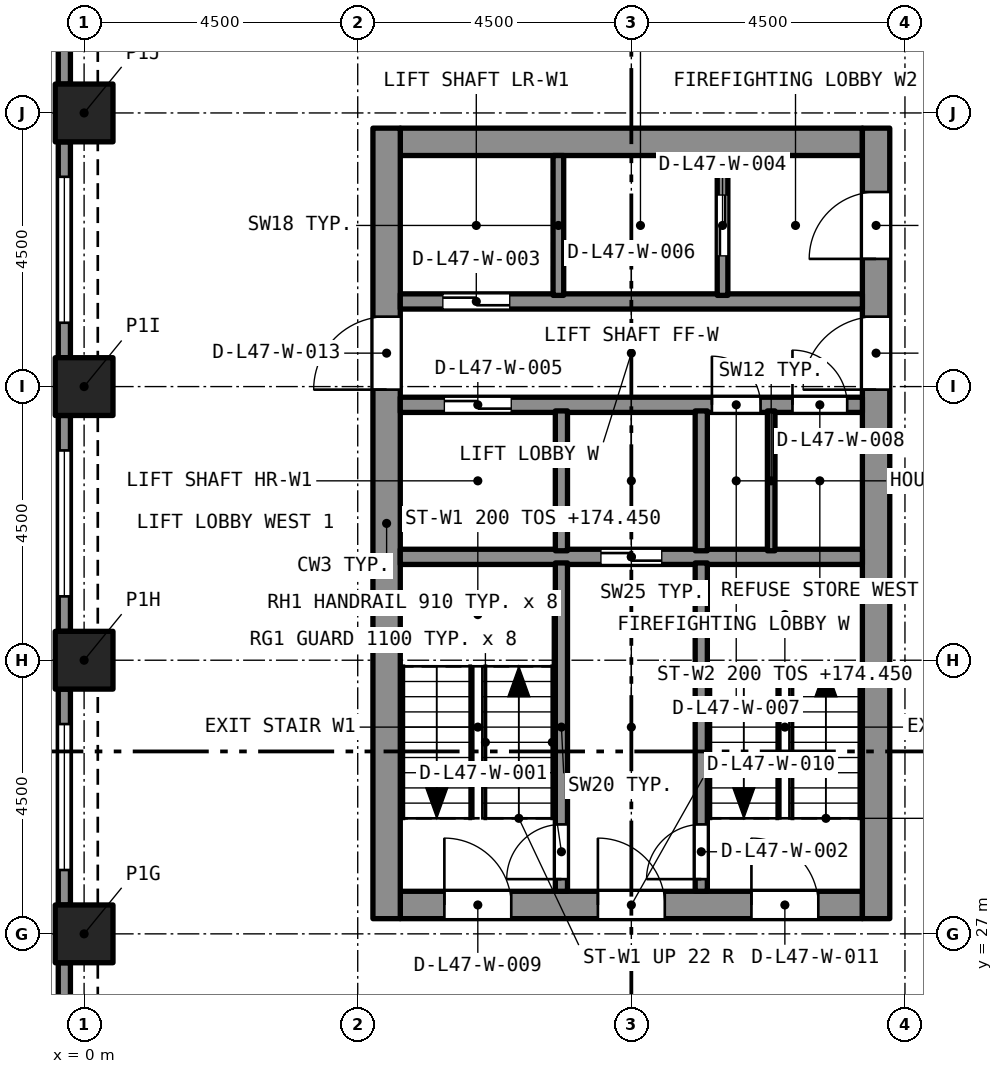
"""IFC4 building model, lengths in metres.
Left out: names, types, materials, properties, quantities, classifications, styles, units other than length and angle.
Written with IfcOpenShell. Run it as: python <this file> out.ifc"""

import sys

from ifc_helpers import new_model, si_unit, direction, frame, frame_2d, origin, origin_2d, place, context, subcontext, project, spatial, rectangle, extrude, element, fill, save


model = new_model("IFC4")
c1 = context("Model", 3, precision=1e-05, world=origin(), true_north=direction((0.0, 1.0)))
c2 = subcontext(c1, "Body", "Model", "MODEL_VIEW")
j1 = project(units=[si_unit("LENGTHUNIT", "METRE"), si_unit("PLANEANGLEUNIT", "RADIAN")], contexts=[c1])
p1 = place(None, origin())
s1 = spatial("IfcSite", under=j1, at=p1, CompositionType="ELEMENT")
p2 = place(p1, origin())
s2 = spatial("IfcBuilding", under=s1, at=p2, CompositionType="ELEMENT")
p3 = place(p2, frame((0.0, 0.0, 172.6)))
s3 = spatial("IfcBuildingStorey", under=s2, at=p3, CompositionType="ELEMENT", Elevation=172.6)
for number, where, z_axis, x_axis in (
    (1, (0.0, 27.0, 0.0), (0.0, 0.0, 1.0), (1.0, 0.0, 0.0)),
    (2, (0.0, 31.5, 0.0), (0.0, 0.0, 1.0), (1.0, 0.0, 0.0)),
    (3, (0.0, 36.0, 0.0), (0.0, 0.0, 1.0), (1.0, 0.0, 0.0)),
    (4, (0.0, 40.5, 0.0), (0.0, 0.0, 1.0), (1.0, 0.0, 0.0)),
):
    element("IfcColumn", number, at=place(p3, frame(where, z_axis=z_axis, x_axis=x_axis)), inside=s3, PredefinedType="COLUMN", context=c2, shape_type="SweptSolid", body=[
        extrude(rectangle(XDim=0.95, YDim=0.95, at=origin_2d()), origin(), (0.0, 0.0, 1.0), 3.7),
    ])
p4 = place(p3, frame((5.2, 27.475, 0.0), z_axis=(0.0, 0.0, 1.0), x_axis=(1.0, 0.0, 0.0)))
e5 = element("IfcWall", 5, at=p4, inside=s3, PredefinedType="SOLIDWALL", context=c2, shape_type="SweptSolid", body=[
    extrude(rectangle(XDim=7.6, YDim=0.45, at=frame_2d((3.8, 0.0))), origin(), (0.0, 0.0, 1.0), 3.7),
])
p5 = place(p4, frame((0.725, 0.0, 0.0)))
e6 = element("IfcOpeningElement", 6, at=p5, cuts=e5, PredefinedType="OPENING", context=c2, shape_type="SweptSolid", body=[
    extrude(rectangle(XDim=1.1, YDim=2.1, at=frame_2d((0.55, 1.05))), frame((0.0, 0.235, 0.0), z_axis=(0.0, -1.0, 0.0), x_axis=(1.0, 0.0, 0.0)), (0.0, 0.0, 1.0), 0.47),
])
p6 = place(p4, frame((3.25, 0.0, 0.0)))
e7 = element("IfcOpeningElement", 7, at=p6, cuts=e5, PredefinedType="OPENING", context=c2, shape_type="SweptSolid", body=[
    extrude(rectangle(XDim=1.1, YDim=2.1, at=frame_2d((0.55, 1.05))), frame((0.0, 0.235, 0.0), z_axis=(0.0, -1.0, 0.0), x_axis=(1.0, 0.0, 0.0)), (0.0, 0.0, 1.0), 0.47),
])
p7 = place(p4, frame((5.775, 0.0, 0.0)))
e8 = element("IfcOpeningElement", 8, at=p7, cuts=e5, PredefinedType="OPENING", context=c2, shape_type="SweptSolid", body=[
    extrude(rectangle(XDim=1.1, YDim=2.1, at=frame_2d((0.55, 1.05))), frame((0.0, 0.235, 0.0), z_axis=(0.0, -1.0, 0.0), x_axis=(1.0, 0.0, 0.0)), (0.0, 0.0, 1.0), 0.47),
])
p8 = place(p3, frame((5.2, 40.025, 0.0), z_axis=(0.0, 0.0, 1.0), x_axis=(1.0, 0.0, 0.0)))
e9 = element("IfcWall", 9, at=p8, inside=s3, PredefinedType="SOLIDWALL", context=c2, shape_type="SweptSolid", body=[
    extrude(rectangle(XDim=7.6, YDim=0.45, at=frame_2d((3.8, 0.0))), origin(), (0.0, 0.0, 1.0), 3.7),
])
p9 = place(p3, frame((4.975, 27.25, 0.0), z_axis=(0.0, 0.0, 1.0), x_axis=(0.0, 1.0, 0.0)))
e10 = element("IfcWall", 10, at=p9, inside=s3, PredefinedType="SOLIDWALL", context=c2, shape_type="SweptSolid", body=[
    extrude(rectangle(XDim=13.0, YDim=0.45, at=frame_2d((6.5, 0.0))), origin(), (0.0, 0.0, 1.0), 3.7),
])
p10 = place(p9, frame((8.7, 0.0, 0.0)))
e11 = element("IfcOpeningElement", 11, at=p10, cuts=e10, PredefinedType="OPENING", context=c2, shape_type="SweptSolid", body=[
    extrude(rectangle(XDim=1.2, YDim=2.1, at=frame_2d((0.6, 1.05))), frame((0.0, 0.235, 0.0), z_axis=(0.0, -1.0, 0.0), x_axis=(1.0, 0.0, 0.0)), (0.0, 0.0, 1.0), 0.47),
])
p11 = place(p3, frame((13.025, 27.25, 0.0), z_axis=(0.0, 0.0, 1.0), x_axis=(0.0, 1.0, 0.0)))
e12 = element("IfcWall", 12, at=p11, inside=s3, PredefinedType="SOLIDWALL", context=c2, shape_type="SweptSolid", body=[
    extrude(rectangle(XDim=13.0, YDim=0.45, at=frame_2d((6.5, 0.0))), origin(), (0.0, 0.0, 1.0), 3.7),
])
p12 = place(p11, frame((10.85, 0.0, 0.0)))
e13 = element("IfcOpeningElement", 13, at=p12, cuts=e12, PredefinedType="OPENING", context=c2, shape_type="SweptSolid", body=[
    extrude(rectangle(XDim=1.1, YDim=2.1, at=frame_2d((0.55, 1.05))), frame((0.0, 0.235, 0.0), z_axis=(0.0, -1.0, 0.0), x_axis=(1.0, 0.0, 0.0)), (0.0, 0.0, 1.0), 0.47),
])
p13 = place(p11, frame((8.7, 0.0, 0.0)))
e14 = element("IfcOpeningElement", 14, at=p13, cuts=e12, PredefinedType="OPENING", context=c2, shape_type="SweptSolid", body=[
    extrude(rectangle(XDim=1.2, YDim=2.1, at=frame_2d((0.6, 1.05))), frame((0.0, 0.235, 0.0), z_axis=(0.0, -1.0, 0.0), x_axis=(1.0, 0.0, 0.0)), (0.0, 0.0, 1.0), 0.47),
])
p14 = place(p3, frame((-0.325, 40.975, 0.0), z_axis=(0.0, 0.0, 1.0), x_axis=(0.0, 1.0, 0.0)))
e15 = element("IfcWall", 15, at=p14, inside=s3, PredefinedType="SOLIDWALL", context=c2, shape_type="SweptSolid", body=[
    extrude(rectangle(XDim=3.55, YDim=0.2, at=frame_2d((1.775, 0.0))), origin(), (0.0, 0.0, 1.0), 3.7),
])
p15 = place(p14, frame((0.575, 0.0, 0.45)))
e16 = element("IfcOpeningElement", 16, at=p15, cuts=e15, PredefinedType="OPENING", context=c2, shape_type="SweptSolid", body=[
    extrude(rectangle(XDim=2.4, YDim=1.95, at=frame_2d((1.2, 0.975))), frame((0.0, 0.11, 0.0), z_axis=(0.0, -1.0, 0.0), x_axis=(1.0, 0.0, 0.0)), (0.0, 0.0, 1.0), 0.22),
])
p16 = place(p3, frame((-0.325, 36.475, 0.0), z_axis=(0.0, 0.0, 1.0), x_axis=(0.0, 1.0, 0.0)))
e17 = element("IfcWall", 17, at=p16, inside=s3, PredefinedType="SOLIDWALL", context=c2, shape_type="SweptSolid", body=[
    extrude(rectangle(XDim=3.55, YDim=0.2, at=frame_2d((1.775, 0.0))), origin(), (0.0, 0.0, 1.0), 3.7),
])
p17 = place(p16, frame((0.575, 0.0, 0.45)))
e18 = element("IfcOpeningElement", 18, at=p17, cuts=e17, PredefinedType="OPENING", context=c2, shape_type="SweptSolid", body=[
    extrude(rectangle(XDim=2.4, YDim=1.95, at=frame_2d((1.2, 0.975))), frame((0.0, 0.11, 0.0), z_axis=(0.0, -1.0, 0.0), x_axis=(1.0, 0.0, 0.0)), (0.0, 0.0, 1.0), 0.22),
])
p18 = place(p3, frame((-0.325, 31.975, 0.0), z_axis=(0.0, 0.0, 1.0), x_axis=(0.0, 1.0, 0.0)))
e19 = element("IfcWall", 19, at=p18, inside=s3, PredefinedType="SOLIDWALL", context=c2, shape_type="SweptSolid", body=[
    extrude(rectangle(XDim=3.55, YDim=0.2, at=frame_2d((1.775, 0.0))), origin(), (0.0, 0.0, 1.0), 3.7),
])
p19 = place(p18, frame((0.575, 0.0, 0.45)))
e20 = element("IfcOpeningElement", 20, at=p19, cuts=e19, PredefinedType="OPENING", context=c2, shape_type="SweptSolid", body=[
    extrude(rectangle(XDim=2.4, YDim=1.95, at=frame_2d((1.2, 0.975))), frame((0.0, 0.11, 0.0), z_axis=(0.0, -1.0, 0.0), x_axis=(1.0, 0.0, 0.0)), (0.0, 0.0, 1.0), 0.22),
])
p20 = place(p3, frame((-0.325, 27.475, 0.0), z_axis=(0.0, 0.0, 1.0), x_axis=(0.0, 1.0, 0.0)))
e21 = element("IfcWall", 21, at=p20, inside=s3, PredefinedType="SOLIDWALL", context=c2, shape_type="SweptSolid", body=[
    extrude(rectangle(XDim=3.55, YDim=0.2, at=frame_2d((1.775, 0.0))), origin(), (0.0, 0.0, 1.0), 3.7),
])
p21 = place(p20, frame((0.575, 0.0, 0.45)))
e22 = element("IfcOpeningElement", 22, at=p21, cuts=e21, PredefinedType="OPENING", context=c2, shape_type="SweptSolid", body=[
    extrude(rectangle(XDim=2.4, YDim=1.95, at=frame_2d((1.2, 0.975))), frame((0.0, 0.11, 0.0), z_axis=(0.0, -1.0, 0.0), x_axis=(1.0, 0.0, 0.0)), (0.0, 0.0, 1.0), 0.22),
])
p22 = place(p3, frame((-0.325, 22.975, 0.0), z_axis=(0.0, 0.0, 1.0), x_axis=(0.0, 1.0, 0.0)))
e23 = element("IfcWall", 23, at=p22, inside=s3, PredefinedType="SOLIDWALL", context=c2, shape_type="SweptSolid", body=[
    extrude(rectangle(XDim=3.55, YDim=0.2, at=frame_2d((1.775, 0.0))), origin(), (0.0, 0.0, 1.0), 3.7),
])
p23 = place(p22, frame((0.575, 0.0, 0.45)))
e24 = element("IfcOpeningElement", 24, at=p23, cuts=e23, PredefinedType="OPENING", context=c2, shape_type="SweptSolid", body=[
    extrude(rectangle(XDim=2.4, YDim=1.95, at=frame_2d((1.2, 0.975))), frame((0.0, 0.11, 0.0), z_axis=(0.0, -1.0, 0.0), x_axis=(1.0, 0.0, 0.0)), (0.0, 0.0, 1.0), 0.22),
])
p24 = place(p3, frame((5.2, 33.2, 0.0), z_axis=(0.0, 0.0, 1.0), x_axis=(1.0, 0.0, 0.0)))
e25 = element("IfcWall", 25, at=p24, inside=s3, PredefinedType="SOLIDWALL", context=c2, shape_type="SweptSolid", body=[
    extrude(rectangle(XDim=7.6, YDim=0.25, at=frame_2d((3.8, 0.0))), origin(), (0.0, 0.0, 1.0), 3.4),
])
p25 = place(p24, frame((3.3, 0.0, 0.0)))
e26 = element("IfcOpeningElement", 26, at=p25, cuts=e25, PredefinedType="OPENING", context=c2, shape_type="SweptSolid", body=[
    extrude(rectangle(XDim=1.0, YDim=2.1, at=frame_2d((0.5, 1.05))), frame((0.0, 0.135, 0.0), z_axis=(0.0, -1.0, 0.0), x_axis=(1.0, 0.0, 0.0)), (0.0, 0.0, 1.0), 0.27),
])
p26 = place(p3, frame((5.2, 35.7, 0.0), z_axis=(0.0, 0.0, 1.0), x_axis=(1.0, 0.0, 0.0)))
e27 = element("IfcWall", 27, at=p26, inside=s3, PredefinedType="SOLIDWALL", context=c2, shape_type="SweptSolid", body=[
    extrude(rectangle(XDim=7.6, YDim=0.25, at=frame_2d((3.8, 0.0))), origin(), (0.0, 0.0, 1.0), 3.4),
])
p27 = place(p26, frame((0.725, 0.0, 0.0)))
e28 = element("IfcOpeningElement", 28, at=p27, cuts=e27, PredefinedType="OPENING", context=c2, shape_type="SweptSolid", body=[
    extrude(rectangle(XDim=1.1, YDim=2.4, at=frame_2d((0.55, 1.2))), frame((0.0, 0.135, 0.0), z_axis=(0.0, -1.0, 0.0), x_axis=(1.0, 0.0, 0.0)), (0.0, 0.0, 1.0), 0.27),
])
p28 = place(p26, frame((5.125, 0.0, 0.0)))
e29 = element("IfcOpeningElement", 29, at=p28, cuts=e27, PredefinedType="OPENING", context=c2, shape_type="SweptSolid", body=[
    extrude(rectangle(XDim=0.8, YDim=2.1, at=frame_2d((0.4, 1.05))), frame((0.0, 0.135, 0.0), z_axis=(0.0, -1.0, 0.0), x_axis=(1.0, 0.0, 0.0)), (0.0, 0.0, 1.0), 0.27),
])
p29 = place(p26, frame((6.45, 0.0, 0.0)))
e30 = element("IfcOpeningElement", 30, at=p29, cuts=e27, PredefinedType="OPENING", context=c2, shape_type="SweptSolid", body=[
    extrude(rectangle(XDim=0.9, YDim=2.1, at=frame_2d((0.45, 1.05))), frame((0.0, 0.135, 0.0), z_axis=(0.0, -1.0, 0.0), x_axis=(1.0, 0.0, 0.0)), (0.0, 0.0, 1.0), 0.27),
])
p30 = place(p3, frame((5.2, 37.4, 0.0), z_axis=(0.0, 0.0, 1.0), x_axis=(1.0, 0.0, 0.0)))
e31 = element("IfcWall", 31, at=p30, inside=s3, PredefinedType="SOLIDWALL", context=c2, shape_type="SweptSolid", body=[
    extrude(rectangle(XDim=7.6, YDim=0.25, at=frame_2d((3.8, 0.0))), origin(), (0.0, 0.0, 1.0), 3.4),
])
p31 = place(p30, frame((0.7, 0.0, 0.0)))
e32 = element("IfcOpeningElement", 32, at=p31, cuts=e31, PredefinedType="OPENING", context=c2, shape_type="SweptSolid", body=[
    extrude(rectangle(XDim=1.1, YDim=2.4, at=frame_2d((0.55, 1.2))), frame((0.0, 0.135, 0.0), z_axis=(0.0, -1.0, 0.0), x_axis=(1.0, 0.0, 0.0)), (0.0, 0.0, 1.0), 0.27),
])
p32 = place(p3, frame((7.85, 27.7, 0.0), z_axis=(0.0, 0.0, 1.0), x_axis=(0.0, 1.0, 0.0)))
e33 = element("IfcWall", 33, at=p32, inside=s3, PredefinedType="SOLIDWALL", context=c2, shape_type="SweptSolid", body=[
    extrude(rectangle(XDim=5.4, YDim=0.2, at=frame_2d((2.7, 0.0))), origin(), (0.0, 0.0, 1.0), 3.4),
])
p33 = place(p32, frame((0.2, 0.0, 0.0)))
e34 = element("IfcOpeningElement", 34, at=p33, cuts=e33, PredefinedType="OPENING", context=c2, shape_type="SweptSolid", body=[
    extrude(rectangle(XDim=0.9, YDim=2.1, at=frame_2d((0.45, 1.05))), frame((0.0, 0.11, 0.0), z_axis=(0.0, -1.0, 0.0), x_axis=(1.0, 0.0, 0.0)), (0.0, 0.0, 1.0), 0.22),
])
p34 = place(p3, frame((10.15, 27.7, 0.0), z_axis=(0.0, 0.0, 1.0), x_axis=(0.0, 1.0, 0.0)))
e35 = element("IfcWall", 35, at=p34, inside=s3, PredefinedType="SOLIDWALL", context=c2, shape_type="SweptSolid", body=[
    extrude(rectangle(XDim=5.4, YDim=0.2, at=frame_2d((2.7, 0.0))), origin(), (0.0, 0.0, 1.0), 3.4),
])
p35 = place(p34, frame((0.2, 0.0, 0.0)))
e36 = element("IfcOpeningElement", 36, at=p35, cuts=e35, PredefinedType="OPENING", context=c2, shape_type="SweptSolid", body=[
    extrude(rectangle(XDim=0.9, YDim=2.1, at=frame_2d((0.45, 1.05))), frame((0.0, 0.11, 0.0), z_axis=(0.0, -1.0, 0.0), x_axis=(1.0, 0.0, 0.0)), (0.0, 0.0, 1.0), 0.22),
])
for number, where, z_axis, x_axis in (
    (37, (7.85, 33.3, 0.0), (0.0, 0.0, 1.0), (0.0, 1.0, 0.0)),
    (38, (10.15, 33.3, 0.0), (0.0, 0.0, 1.0), (0.0, 1.0, 0.0)),
):
    element("IfcWall", number, at=place(p3, frame(where, z_axis=z_axis, x_axis=x_axis)), inside=s3, PredefinedType="SOLIDWALL", context=c2, shape_type="SweptSolid", body=[
        extrude(rectangle(XDim=2.3, YDim=0.2, at=frame_2d((1.15, 0.0))), origin(), (0.0, 0.0, 1.0), 3.4),
    ])
p36 = place(p3, frame((7.8, 37.5, 0.0), z_axis=(0.0, 0.0, 1.0), x_axis=(0.0, 1.0, 0.0)))
e39 = element("IfcWall", 39, at=p36, inside=s3, PredefinedType="SOLIDWALL", context=c2, shape_type="SweptSolid", body=[
    extrude(rectangle(XDim=2.3, YDim=0.175, at=frame_2d((1.15, 0.0))), origin(), (0.0, 0.0, 1.0), 3.4),
])
p37 = place(p3, frame((10.5, 37.5, 0.0), z_axis=(0.0, 0.0, 1.0), x_axis=(0.0, 1.0, 0.0)))
e40 = element("IfcWall", 40, at=p37, inside=s3, PredefinedType="SOLIDWALL", context=c2, shape_type="SweptSolid", body=[
    extrude(rectangle(XDim=2.3, YDim=0.175, at=frame_2d((1.15, 0.0))), origin(), (0.0, 0.0, 1.0), 3.4),
])
p38 = place(p37, frame((0.65, 0.0, 0.0)))
e41 = element("IfcOpeningElement", 41, at=p38, cuts=e40, PredefinedType="OPENING", context=c2, shape_type="SweptSolid", body=[
    extrude(rectangle(XDim=1.0, YDim=2.1, at=frame_2d((0.5, 1.05))), frame((0.0, 0.097, 0.0), z_axis=(0.0, -1.0, 0.0), x_axis=(1.0, 0.0, 0.0)), (0.0, 0.0, 1.0), 0.195),
])
p39 = place(p3, frame((11.3, 33.3, 0.0), z_axis=(0.0, 0.0, 1.0), x_axis=(0.0, 1.0, 0.0)))
e42 = element("IfcWall", 42, at=p39, inside=s3, PredefinedType="PARTITIONING", context=c2, shape_type="SweptSolid", body=[
    extrude(rectangle(XDim=2.3, YDim=0.125, at=frame_2d((1.15, 0.0))), origin(), (0.0, 0.0, 1.0), 3.4),
])
p40 = place(p17, origin())
e43 = element("IfcWindow", 43, at=p40, inside=s3, PartitioningType="SINGLE_PANEL", PredefinedType="WINDOW", context=c2, shape_type="SweptSolid", body=[
    extrude(rectangle(XDim=2.4, YDim=1.95, at=frame_2d((1.2, 0.975))), frame((0.0, 0.03, 0.0), z_axis=(0.0, -1.0, 0.0), x_axis=(1.0, 0.0, 0.0)), (0.0, 0.0, 1.0), 0.06),
])
fill(e18, e43)
p41 = place(p19, origin())
e44 = element("IfcWindow", 44, at=p41, inside=s3, PartitioningType="SINGLE_PANEL", PredefinedType="WINDOW", context=c2, shape_type="SweptSolid", body=[
    extrude(rectangle(XDim=2.4, YDim=1.95, at=frame_2d((1.2, 0.975))), frame((0.0, 0.03, 0.0), z_axis=(0.0, -1.0, 0.0), x_axis=(1.0, 0.0, 0.0)), (0.0, 0.0, 1.0), 0.06),
])
fill(e20, e44)
p42 = place(p21, origin())
e45 = element("IfcWindow", 45, at=p42, inside=s3, PartitioningType="SINGLE_PANEL", PredefinedType="WINDOW", context=c2, shape_type="SweptSolid", body=[
    extrude(rectangle(XDim=2.4, YDim=1.95, at=frame_2d((1.2, 0.975))), frame((0.0, 0.03, 0.0), z_axis=(0.0, -1.0, 0.0), x_axis=(1.0, 0.0, 0.0)), (0.0, 0.0, 1.0), 0.06),
])
fill(e22, e45)
p43 = place(p33, origin())
e46 = element("IfcDoor", 46, at=p43, inside=s3, OperationType="SINGLE_SWING_LEFT", PredefinedType="DOOR", context=c2, shape_type="SweptSolid", body=[
    extrude(rectangle(XDim=0.9, YDim=2.1, at=frame_2d((0.45, 1.05))), frame((0.0, 0.025, 0.0), z_axis=(0.0, -1.0, 0.0), x_axis=(1.0, 0.0, 0.0)), (0.0, 0.0, 1.0), 0.05),
])
fill(e34, e46)
p44 = place(p35, origin())
e47 = element("IfcDoor", 47, at=p44, inside=s3, OperationType="SINGLE_SWING_LEFT", PredefinedType="DOOR", context=c2, shape_type="SweptSolid", body=[
    extrude(rectangle(XDim=0.9, YDim=2.1, at=frame_2d((0.45, 1.05))), frame((0.0, 0.025, 0.0), z_axis=(0.0, -1.0, 0.0), x_axis=(1.0, 0.0, 0.0)), (0.0, 0.0, 1.0), 0.05),
])
fill(e36, e47)
p45 = place(p31, origin())
e48 = element("IfcDoor", 48, at=p45, inside=s3, OperationType="SLIDING_TO_LEFT", PredefinedType="DOOR", context=c2, shape_type="SweptSolid", body=[
    extrude(rectangle(XDim=1.1, YDim=2.4, at=frame_2d((0.55, 1.2))), frame((0.0, 0.025, 0.0), z_axis=(0.0, -1.0, 0.0), x_axis=(1.0, 0.0, 0.0)), (0.0, 0.0, 1.0), 0.05),
])
fill(e32, e48)
p46 = place(p38, origin())
e49 = element("IfcDoor", 49, at=p46, inside=s3, OperationType="SLIDING_TO_LEFT", PredefinedType="DOOR", context=c2, shape_type="SweptSolid", body=[
    extrude(rectangle(XDim=1.0, YDim=2.1, at=frame_2d((0.5, 1.05))), frame((0.0, 0.025, 0.0), z_axis=(0.0, -1.0, 0.0), x_axis=(1.0, 0.0, 0.0)), (0.0, 0.0, 1.0), 0.05),
])
fill(e41, e49)
p47 = place(p27, origin())
e50 = element("IfcDoor", 50, at=p47, inside=s3, OperationType="SLIDING_TO_LEFT", PredefinedType="DOOR", context=c2, shape_type="SweptSolid", body=[
    extrude(rectangle(XDim=1.1, YDim=2.4, at=frame_2d((0.55, 1.2))), frame((0.0, 0.025, 0.0), z_axis=(0.0, -1.0, 0.0), x_axis=(1.0, 0.0, 0.0)), (0.0, 0.0, 1.0), 0.05),
])
fill(e28, e50)
p48 = place(p25, origin())
e51 = element("IfcDoor", 51, at=p48, inside=s3, OperationType="SLIDING_TO_LEFT", PredefinedType="DOOR", context=c2, shape_type="SweptSolid", body=[
    extrude(rectangle(XDim=1.0, YDim=2.1, at=frame_2d((0.5, 1.05))), frame((0.0, 0.025, 0.0), z_axis=(0.0, -1.0, 0.0), x_axis=(1.0, 0.0, 0.0)), (0.0, 0.0, 1.0), 0.05),
])
fill(e26, e51)
p49 = place(p28, origin())
e52 = element("IfcDoor", 52, at=p49, inside=s3, OperationType="SINGLE_SWING_LEFT", PredefinedType="DOOR", context=c2, shape_type="SweptSolid", body=[
    extrude(rectangle(XDim=0.8, YDim=2.1, at=frame_2d((0.4, 1.05))), frame((0.0, 0.025, 0.0), z_axis=(0.0, -1.0, 0.0), x_axis=(1.0, 0.0, 0.0)), (0.0, 0.0, 1.0), 0.05),
])
fill(e29, e52)
p50 = place(p29, origin())
e53 = element("IfcDoor", 53, at=p50, inside=s3, OperationType="SINGLE_SWING_LEFT", PredefinedType="DOOR", context=c2, shape_type="SweptSolid", body=[
    extrude(rectangle(XDim=0.9, YDim=2.1, at=frame_2d((0.45, 1.05))), frame((0.0, 0.025, 0.0), z_axis=(0.0, -1.0, 0.0), x_axis=(1.0, 0.0, 0.0)), (0.0, 0.0, 1.0), 0.05),
])
fill(e30, e53)
p51 = place(p5, origin())
e54 = element("IfcDoor", 54, at=p51, inside=s3, OperationType="SINGLE_SWING_LEFT", PredefinedType="DOOR", context=c2, shape_type="SweptSolid", body=[
    extrude(rectangle(XDim=1.1, YDim=2.1, at=frame_2d((0.55, 1.05))), frame((0.0, 0.025, 0.0), z_axis=(0.0, -1.0, 0.0), x_axis=(1.0, 0.0, 0.0)), (0.0, 0.0, 1.0), 0.05),
])
fill(e6, e54)
p52 = place(p6, origin())
e55 = element("IfcDoor", 55, at=p52, inside=s3, OperationType="SINGLE_SWING_LEFT", PredefinedType="DOOR", context=c2, shape_type="SweptSolid", body=[
    extrude(rectangle(XDim=1.1, YDim=2.1, at=frame_2d((0.55, 1.05))), frame((0.0, 0.025, 0.0), z_axis=(0.0, -1.0, 0.0), x_axis=(1.0, 0.0, 0.0)), (0.0, 0.0, 1.0), 0.05),
])
fill(e7, e55)
p53 = place(p7, origin())
e56 = element("IfcDoor", 56, at=p53, inside=s3, OperationType="SINGLE_SWING_LEFT", PredefinedType="DOOR", context=c2, shape_type="SweptSolid", body=[
    extrude(rectangle(XDim=1.1, YDim=2.1, at=frame_2d((0.55, 1.05))), frame((0.0, 0.025, 0.0), z_axis=(0.0, -1.0, 0.0), x_axis=(1.0, 0.0, 0.0)), (0.0, 0.0, 1.0), 0.05),
])
fill(e8, e56)
p54 = place(p12, origin())
e57 = element("IfcDoor", 57, at=p54, inside=s3, OperationType="SINGLE_SWING_LEFT", PredefinedType="DOOR", context=c2, shape_type="SweptSolid", body=[
    extrude(rectangle(XDim=1.1, YDim=2.1, at=frame_2d((0.55, 1.05))), frame((0.0, 0.025, 0.0), z_axis=(0.0, -1.0, 0.0), x_axis=(1.0, 0.0, 0.0)), (0.0, 0.0, 1.0), 0.05),
])
fill(e13, e57)
p55 = place(p10, origin())
e58 = element("IfcDoor", 58, at=p55, inside=s3, OperationType="SINGLE_SWING_LEFT", PredefinedType="DOOR", context=c2, shape_type="SweptSolid", body=[
    extrude(rectangle(XDim=1.2, YDim=2.1, at=frame_2d((0.6, 1.05))), frame((0.0, 0.025, 0.0), z_axis=(0.0, -1.0, 0.0), x_axis=(1.0, 0.0, 0.0)), (0.0, 0.0, 1.0), 0.05),
])
fill(e11, e58)
p56 = place(p13, origin())
e59 = element("IfcDoor", 59, at=p56, inside=s3, OperationType="SINGLE_SWING_LEFT", PredefinedType="DOOR", context=c2, shape_type="SweptSolid", body=[
    extrude(rectangle(XDim=1.2, YDim=2.1, at=frame_2d((0.6, 1.05))), frame((0.0, 0.025, 0.0), z_axis=(0.0, -1.0, 0.0), x_axis=(1.0, 0.0, 0.0)), (0.0, 0.0, 1.0), 0.05),
])
fill(e14, e59)
save(model, sys.argv[1])
